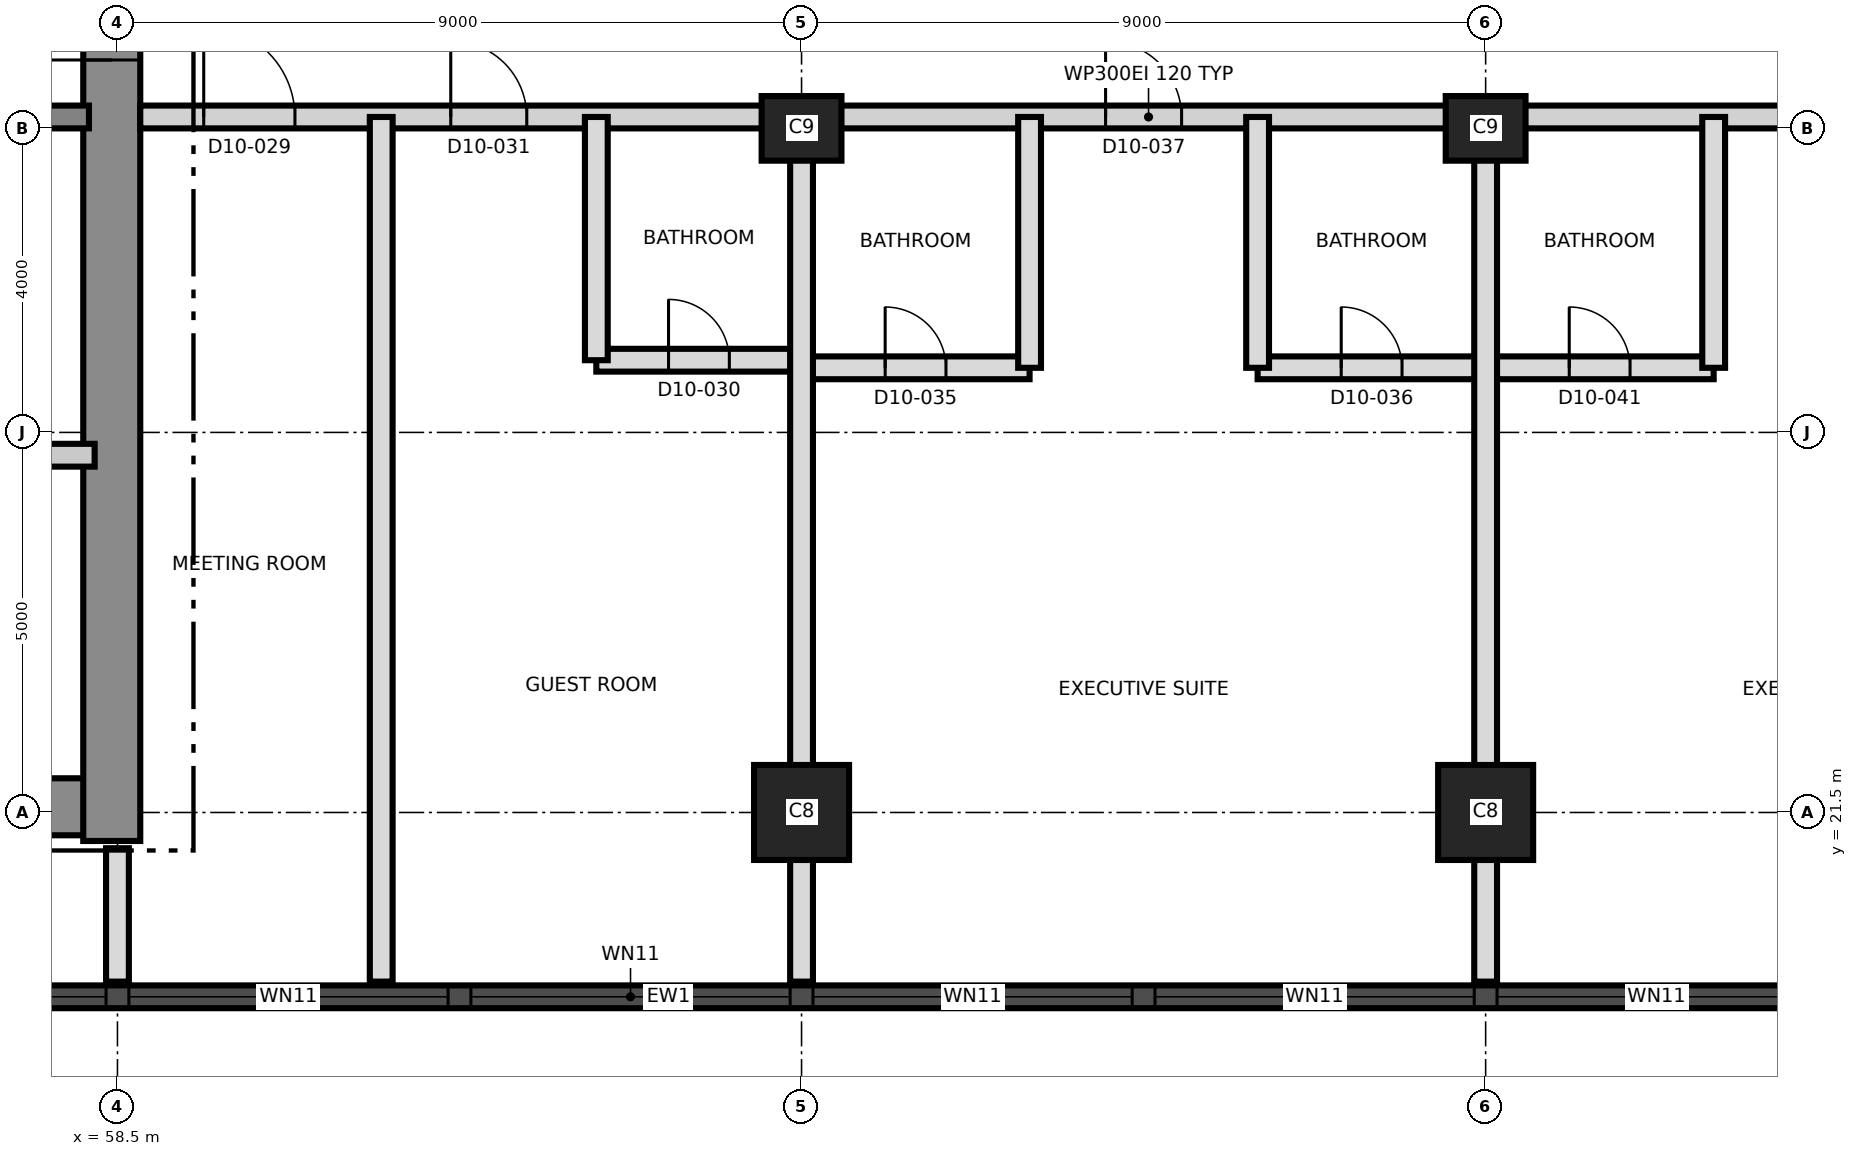
"""IFC4 building model, lengths in metres.
Left out: names, types, materials, properties, quantities, classifications, styles, units other than length and angle.
Written with IfcOpenShell. Run it as: python <this file> out.ifc"""

import sys

from ifc_helpers import new_model, si_unit, direction, frame, frame_2d, origin, origin_2d, place, context, subcontext, project, spatial, rectangle, extrude, element, fill, save


model = new_model("IFC4")
c1 = context("Model", 3, precision=1e-05, world=origin(), true_north=direction((0.0, 1.0)))
c2 = subcontext(c1, "Body", "Model", "MODEL_VIEW")
j1 = project(units=[si_unit("LENGTHUNIT", "METRE"), si_unit("PLANEANGLEUNIT", "RADIAN")], contexts=[c1])
p1 = place(None, origin())
s1 = spatial("IfcSite", under=j1, at=p1, CompositionType="ELEMENT")
p2 = place(p1, origin())
s2 = spatial("IfcBuilding", under=s1, at=p2, CompositionType="ELEMENT")
p3 = place(p2, frame((0.0, 0.0, 120.4)))
s3 = spatial("IfcBuildingStorey", under=s2, at=p3, CompositionType="ELEMENT", Elevation=120.4)
p4 = place(p3, frame((31.125, 21.575, 0.0), z_axis=(0.0, 0.0, 1.0), x_axis=(1.0, 0.0, 0.0)))
e1 = element("IfcWall", 1, at=p4, inside=s3, PredefinedType="SHEAR", context=c2, shape_type="SweptSolid", body=[
    extrude(rectangle(XDim=27.0, YDim=0.75, at=frame_2d((13.5, 0.0))), origin(), (0.0, 0.0, 1.0), 3.7),
])
p5 = place(p3, frame((58.425, 21.125, 0.0), z_axis=(0.0, 0.0, 1.0), x_axis=(0.0, 1.0, 0.0)))
e2 = element("IfcWall", 2, at=p5, inside=s3, PredefinedType="SHEAR", context=c2, shape_type="SweptSolid", body=[
    extrude(rectangle(XDim=18.75, YDim=0.75, at=frame_2d((9.375, 0.0))), origin(), (0.0, 0.0, 1.0), 3.7),
])
p6 = place(p5, frame((10.275, 0.0, 0.0)))
e3 = element("IfcOpeningElement", 3, at=p6, cuts=e2, PredefinedType="OPENING", context=c2, shape_type="SweptSolid", body=[
    extrude(rectangle(XDim=1.2, YDim=2.1, at=frame_2d((0.6, 1.05))), frame((0.0, 0.385, 0.0), z_axis=(0.0, -1.0, 0.0), x_axis=(1.0, 0.0, 0.0)), (0.0, 0.0, 1.0), 0.77),
])
p7 = place(p3, frame((31.875, 30.65, 0.0), z_axis=(0.0, 0.0, 1.0), x_axis=(1.0, 0.0, 0.0)))
e4 = element("IfcWall", 4, at=p7, inside=s3, PredefinedType="SHEAR", context=c2, shape_type="SweptSolid", body=[
    extrude(rectangle(XDim=26.25, YDim=0.3, at=frame_2d((13.125, 0.0))), origin(), (0.0, 0.0, 1.0), 3.7),
])
p8 = place(p7, frame((24.625, 0.0, 0.0)))
e5 = element("IfcOpeningElement", 5, at=p8, cuts=e4, PredefinedType="OPENING", context=c2, shape_type="SweptSolid", body=[
    extrude(rectangle(XDim=1.0, YDim=2.1, at=frame_2d((0.5, 1.05))), frame((0.0, 0.16, 0.0), z_axis=(0.0, -1.0, 0.0), x_axis=(1.0, 0.0, 0.0)), (0.0, 0.0, 1.0), 0.32),
])
p9 = place(p7, frame((11.425, 0.0, 0.0)))
e6 = element("IfcOpeningElement", 6, at=p9, cuts=e4, PredefinedType="OPENING", context=c2, shape_type="SweptSolid", body=[
    extrude(rectangle(XDim=1.0, YDim=2.1, at=frame_2d((0.5, 1.05))), frame((0.0, 0.16, 0.0), z_axis=(0.0, -1.0, 0.0), x_axis=(1.0, 0.0, 0.0)), (0.0, 0.0, 1.0), 0.32),
])
for number, where, z_axis, x_axis in (
    (7, (67.5, 21.5, 0.0), (0.0, 0.0, 1.0), (1.0, 0.0, 0.0)),
    (8, (76.5, 21.5, 0.0), (0.0, 0.0, 1.0), (1.0, 0.0, 0.0)),
):
    element("IfcColumn", number, at=place(p3, frame(where, z_axis=z_axis, x_axis=x_axis)), inside=s3, PredefinedType="COLUMN", context=c2, shape_type="SweptSolid", body=[
        extrude(rectangle(XDim=1.25, YDim=1.25, at=origin_2d()), origin(), (0.0, 0.0, 1.0), 3.7),
    ])
for number, where, z_axis, x_axis in (
    (9, (67.5, 30.5, 0.0), (0.0, 0.0, 1.0), (1.0, 0.0, 0.0)),
    (10, (76.5, 30.5, 0.0), (0.0, 0.0, 1.0), (1.0, 0.0, 0.0)),
):
    element("IfcColumn", number, at=place(p3, frame(where, z_axis=z_axis, x_axis=x_axis)), inside=s3, PredefinedType="COLUMN", context=c2, shape_type="SweptSolid", body=[
        extrude(rectangle(XDim=1.05, YDim=0.85, at=origin_2d()), origin(), (0.0, 0.0, 1.0), 3.7),
    ])
p10 = place(p3, frame((44.01, 19.075, 0.0), z_axis=(0.0, 0.0, 1.0), x_axis=(1.0, 0.0, 0.0)))
e11 = element("IfcWall", 11, at=p10, inside=s3, PredefinedType="SOLIDWALL", context=c2, shape_type="SweptSolid", body=[
    extrude(rectangle(XDim=43.478, YDim=0.3, at=frame_2d((21.739, 0.0))), origin(), (0.0, 0.0, 1.0), 3.4),
])
p11 = place(p10, frame((1.845, 0.0, 0.3)))
e12 = element("IfcOpeningElement", 12, at=p11, cuts=e11, PredefinedType="OPENING", context=c2, shape_type="SweptSolid", body=[
    extrude(rectangle(XDim=1.8, YDim=2.4, at=frame_2d((0.9, 1.2))), frame((0.0, 0.16, 0.0), z_axis=(0.0, -1.0, 0.0), x_axis=(1.0, 0.0, 0.0)), (0.0, 0.0, 1.0), 0.32),
])
p12 = place(p10, frame((5.64, 0.0, 0.9)))
e13 = element("IfcOpeningElement", 13, at=p12, cuts=e11, PredefinedType="OPENING", context=c2, shape_type="SweptSolid", body=[
    extrude(rectangle(XDim=4.2, YDim=1.5, at=frame_2d((2.1, 0.75))), frame((0.0, 0.16, 0.0), z_axis=(0.0, -1.0, 0.0), x_axis=(1.0, 0.0, 0.0)), (0.0, 0.0, 1.0), 0.32),
])
p13 = place(p10, frame((10.14, 0.0, 0.9)))
e14 = element("IfcOpeningElement", 14, at=p13, cuts=e11, PredefinedType="OPENING", context=c2, shape_type="SweptSolid", body=[
    extrude(rectangle(XDim=4.2, YDim=1.5, at=frame_2d((2.1, 0.75))), frame((0.0, 0.16, 0.0), z_axis=(0.0, -1.0, 0.0), x_axis=(1.0, 0.0, 0.0)), (0.0, 0.0, 1.0), 0.32),
])
p14 = place(p10, frame((14.64, 0.0, 0.9)))
e15 = element("IfcOpeningElement", 15, at=p14, cuts=e11, PredefinedType="OPENING", context=c2, shape_type="SweptSolid", body=[
    extrude(rectangle(XDim=4.2, YDim=1.5, at=frame_2d((2.1, 0.75))), frame((0.0, 0.16, 0.0), z_axis=(0.0, -1.0, 0.0), x_axis=(1.0, 0.0, 0.0)), (0.0, 0.0, 1.0), 0.32),
])
p15 = place(p10, frame((19.14, 0.0, 0.9)))
e16 = element("IfcOpeningElement", 16, at=p15, cuts=e11, PredefinedType="OPENING", context=c2, shape_type="SweptSolid", body=[
    extrude(rectangle(XDim=4.2, YDim=1.5, at=frame_2d((2.1, 0.75))), frame((0.0, 0.16, 0.0), z_axis=(0.0, -1.0, 0.0), x_axis=(1.0, 0.0, 0.0)), (0.0, 0.0, 1.0), 0.32),
])
p16 = place(p10, frame((23.64, 0.0, 0.9)))
e17 = element("IfcOpeningElement", 17, at=p16, cuts=e11, PredefinedType="OPENING", context=c2, shape_type="SweptSolid", body=[
    extrude(rectangle(XDim=4.2, YDim=1.5, at=frame_2d((2.1, 0.75))), frame((0.0, 0.16, 0.0), z_axis=(0.0, -1.0, 0.0), x_axis=(1.0, 0.0, 0.0)), (0.0, 0.0, 1.0), 0.32),
])
p17 = place(p10, frame((28.14, 0.0, 0.9)))
e18 = element("IfcOpeningElement", 18, at=p17, cuts=e11, PredefinedType="OPENING", context=c2, shape_type="SweptSolid", body=[
    extrude(rectangle(XDim=4.2, YDim=1.5, at=frame_2d((2.1, 0.75))), frame((0.0, 0.16, 0.0), z_axis=(0.0, -1.0, 0.0), x_axis=(1.0, 0.0, 0.0)), (0.0, 0.0, 1.0), 0.32),
])
p18 = place(p10, frame((32.64, 0.0, 0.9)))
e19 = element("IfcOpeningElement", 19, at=p18, cuts=e11, PredefinedType="OPENING", context=c2, shape_type="SweptSolid", body=[
    extrude(rectangle(XDim=4.2, YDim=1.5, at=frame_2d((2.1, 0.75))), frame((0.0, 0.16, 0.0), z_axis=(0.0, -1.0, 0.0), x_axis=(1.0, 0.0, 0.0)), (0.0, 0.0, 1.0), 0.32),
])
p19 = place(p10, frame((37.14, 0.0, 0.9)))
e20 = element("IfcOpeningElement", 20, at=p19, cuts=e11, PredefinedType="OPENING", context=c2, shape_type="SweptSolid", body=[
    extrude(rectangle(XDim=4.2, YDim=1.5, at=frame_2d((2.1, 0.75))), frame((0.0, 0.16, 0.0), z_axis=(0.0, -1.0, 0.0), x_axis=(1.0, 0.0, 0.0)), (0.0, 0.0, 1.0), 0.32),
])
p20 = place(p3, frame((55.8, 26.2, 0.0), z_axis=(0.0, 0.0, 1.0), x_axis=(1.0, 0.0, 0.0)))
e21 = element("IfcWall", 21, at=p20, inside=s3, PredefinedType="PARTITIONING", context=c2, shape_type="SweptSolid", body=[
    extrude(rectangle(XDim=2.4, YDim=0.3, at=frame_2d((1.2, 0.0))), origin(), (0.0, 0.0, 1.0), 3.4),
])
p21 = place(p20, frame((0.75, 0.0, 0.0)))
e22 = element("IfcOpeningElement", 22, at=p21, cuts=e21, PredefinedType="OPENING", context=c2, shape_type="SweptSolid", body=[
    extrude(rectangle(XDim=0.9, YDim=2.1, at=frame_2d((0.45, 1.05))), frame((0.0, 0.16, 0.0), z_axis=(0.0, -1.0, 0.0), x_axis=(1.0, 0.0, 0.0)), (0.0, 0.0, 1.0), 0.32),
])
p22 = place(p3, frame((67.5, 27.35, 0.0), z_axis=(0.0, 0.0, 1.0), x_axis=(1.0, 0.0, 0.0)))
e23 = element("IfcWall", 23, at=p22, inside=s3, PredefinedType="PARTITIONING", context=c2, shape_type="SweptSolid", body=[
    extrude(rectangle(XDim=3.0, YDim=0.3, at=frame_2d((1.5, 0.0))), origin(), (0.0, 0.0, 1.0), 3.4),
])
p23 = place(p22, frame((1.1, 0.0, 0.0)))
e24 = element("IfcOpeningElement", 24, at=p23, cuts=e23, PredefinedType="OPENING", context=c2, shape_type="SweptSolid", body=[
    extrude(rectangle(XDim=0.8, YDim=2.1, at=frame_2d((0.4, 1.05))), frame((0.0, 0.16, 0.0), z_axis=(0.0, -1.0, 0.0), x_axis=(1.0, 0.0, 0.0)), (0.0, 0.0, 1.0), 0.32),
])
p24 = place(p3, frame((73.5, 27.35, 0.0), z_axis=(0.0, 0.0, 1.0), x_axis=(1.0, 0.0, 0.0)))
e25 = element("IfcWall", 25, at=p24, inside=s3, PredefinedType="PARTITIONING", context=c2, shape_type="SweptSolid", body=[
    extrude(rectangle(XDim=6.0, YDim=0.3, at=frame_2d((3.0, 0.0))), origin(), (0.0, 0.0, 1.0), 3.4),
])
p25 = place(p24, frame((1.1, 0.0, 0.0)))
e26 = element("IfcOpeningElement", 26, at=p25, cuts=e25, PredefinedType="OPENING", context=c2, shape_type="SweptSolid", body=[
    extrude(rectangle(XDim=0.8, YDim=2.1, at=frame_2d((0.4, 1.05))), frame((0.0, 0.16, 0.0), z_axis=(0.0, -1.0, 0.0), x_axis=(1.0, 0.0, 0.0)), (0.0, 0.0, 1.0), 0.32),
])
p26 = place(p24, frame((4.1, 0.0, 0.0)))
e27 = element("IfcOpeningElement", 27, at=p26, cuts=e25, PredefinedType="OPENING", context=c2, shape_type="SweptSolid", body=[
    extrude(rectangle(XDim=0.8, YDim=2.1, at=frame_2d((0.4, 1.05))), frame((0.0, 0.16, 0.0), z_axis=(0.0, -1.0, 0.0), x_axis=(1.0, 0.0, 0.0)), (0.0, 0.0, 1.0), 0.32),
])
p27 = place(p3, frame((64.8, 27.45, 0.0), z_axis=(0.0, 0.0, 1.0), x_axis=(1.0, 0.0, 0.0)))
e28 = element("IfcWall", 28, at=p27, inside=s3, PredefinedType="PARTITIONING", context=c2, shape_type="SweptSolid", body=[
    extrude(rectangle(XDim=2.7, YDim=0.3, at=frame_2d((1.35, 0.0))), origin(), (0.0, 0.0, 1.0), 3.4),
])
p28 = place(p27, frame((0.95, 0.0, 0.0)))
e29 = element("IfcOpeningElement", 29, at=p28, cuts=e28, PredefinedType="OPENING", context=c2, shape_type="SweptSolid", body=[
    extrude(rectangle(XDim=0.8, YDim=2.1, at=frame_2d((0.4, 1.05))), frame((0.0, 0.16, 0.0), z_axis=(0.0, -1.0, 0.0), x_axis=(1.0, 0.0, 0.0)), (0.0, 0.0, 1.0), 0.32),
])
p29 = place(p3, frame((58.8, 30.65, 0.0), z_axis=(0.0, 0.0, 1.0), x_axis=(1.0, 0.0, 0.0)))
e30 = element("IfcWall", 30, at=p29, inside=s3, PredefinedType="PARTITIONING", context=c2, shape_type="SweptSolid", body=[
    extrude(rectangle(XDim=26.53, YDim=0.3, at=frame_2d((13.265, 0.0))), origin(), (0.0, 0.0, 1.0), 3.4),
])
p30 = place(p29, frame((0.835, 0.0, 0.0)))
e31 = element("IfcOpeningElement", 31, at=p30, cuts=e30, PredefinedType="OPENING", context=c2, shape_type="SweptSolid", body=[
    extrude(rectangle(XDim=1.2, YDim=2.1, at=frame_2d((0.6, 1.05))), frame((0.0, 0.16, 0.0), z_axis=(0.0, -1.0, 0.0), x_axis=(1.0, 0.0, 0.0)), (0.0, 0.0, 1.0), 0.32),
])
p31 = place(p29, frame((4.085, 0.0, 0.0)))
e32 = element("IfcOpeningElement", 32, at=p31, cuts=e30, PredefinedType="OPENING", context=c2, shape_type="SweptSolid", body=[
    extrude(rectangle(XDim=1.0, YDim=2.1, at=frame_2d((0.5, 1.05))), frame((0.0, 0.16, 0.0), z_axis=(0.0, -1.0, 0.0), x_axis=(1.0, 0.0, 0.0)), (0.0, 0.0, 1.0), 0.32),
])
p32 = place(p29, frame((12.7, 0.0, 0.0)))
e33 = element("IfcOpeningElement", 33, at=p32, cuts=e30, PredefinedType="OPENING", context=c2, shape_type="SweptSolid", body=[
    extrude(rectangle(XDim=1.0, YDim=2.4, at=frame_2d((0.5, 1.2))), frame((0.0, 0.16, 0.0), z_axis=(0.0, -1.0, 0.0), x_axis=(1.0, 0.0, 0.0)), (0.0, 0.0, 1.0), 0.32),
])
p33 = place(p29, frame((21.7, 0.0, 0.0)))
e34 = element("IfcOpeningElement", 34, at=p33, cuts=e30, PredefinedType="OPENING", context=c2, shape_type="SweptSolid", body=[
    extrude(rectangle(XDim=1.0, YDim=2.4, at=frame_2d((0.5, 1.2))), frame((0.0, 0.16, 0.0), z_axis=(0.0, -1.0, 0.0), x_axis=(1.0, 0.0, 0.0)), (0.0, 0.0, 1.0), 0.32),
])
p34 = place(p3, frame((58.5, 19.275, 0.0), z_axis=(0.0, 0.0, 1.0), x_axis=(0.0, 1.0, 0.0)))
e35 = element("IfcWall", 35, at=p34, inside=s3, PredefinedType="PARTITIONING", context=c2, shape_type="SweptSolid", body=[
    extrude(rectangle(XDim=1.755, YDim=0.3, at=frame_2d((0.877, 0.0))), origin(), (0.0, 0.0, 1.0), 3.35),
])
p35 = place(p3, frame((61.97, 19.275, 0.0), z_axis=(0.0, 0.0, 1.0), x_axis=(0.0, 1.0, 0.0)))
e36 = element("IfcWall", 36, at=p35, inside=s3, PredefinedType="PARTITIONING", context=c2, shape_type="SweptSolid", body=[
    extrude(rectangle(XDim=11.375, YDim=0.3, at=frame_2d((5.688, 0.0))), origin(), (0.0, 0.0, 1.0), 3.35),
])
p36 = place(p3, frame((64.8, 27.45, 0.0), z_axis=(0.0, 0.0, 1.0), x_axis=(0.0, 1.0, 0.0)))
e37 = element("IfcWall", 37, at=p36, inside=s3, PredefinedType="PARTITIONING", context=c2, shape_type="SweptSolid", body=[
    extrude(rectangle(XDim=3.2, YDim=0.3, at=frame_2d((1.6, 0.0))), origin(), (0.0, 0.0, 1.0), 3.4),
])
p37 = place(p3, frame((67.5, 19.275, 0.0), z_axis=(0.0, 0.0, 1.0), x_axis=(0.0, 1.0, 0.0)))
e38 = element("IfcWall", 38, at=p37, inside=s3, PredefinedType="PARTITIONING", context=c2, shape_type="SweptSolid", body=[
    extrude(rectangle(XDim=11.375, YDim=0.3, at=frame_2d((5.688, 0.0))), origin(), (0.0, 0.0, 1.0), 3.35),
])
for number, where, z_axis, x_axis in (
    (39, (70.5, 27.35, 0.0), (0.0, 0.0, 1.0), (0.0, 1.0, 0.0)),
    (40, (73.5, 27.35, 0.0), (0.0, 0.0, 1.0), (0.0, 1.0, 0.0)),
):
    element("IfcWall", number, at=place(p3, frame(where, z_axis=z_axis, x_axis=x_axis)), inside=s3, PredefinedType="PARTITIONING", context=c2, shape_type="SweptSolid", body=[
        extrude(rectangle(XDim=3.3, YDim=0.3, at=frame_2d((1.65, 0.0))), origin(), (0.0, 0.0, 1.0), 3.4),
    ])
p38 = place(p3, frame((76.5, 19.275, 0.0), z_axis=(0.0, 0.0, 1.0), x_axis=(0.0, 1.0, 0.0)))
e41 = element("IfcWall", 41, at=p38, inside=s3, PredefinedType="PARTITIONING", context=c2, shape_type="SweptSolid", body=[
    extrude(rectangle(XDim=11.375, YDim=0.3, at=frame_2d((5.688, 0.0))), origin(), (0.0, 0.0, 1.0), 3.35),
])
p39 = place(p3, frame((79.5, 27.35, 0.0), z_axis=(0.0, 0.0, 1.0), x_axis=(0.0, 1.0, 0.0)))
e42 = element("IfcWall", 42, at=p39, inside=s3, PredefinedType="PARTITIONING", context=c2, shape_type="SweptSolid", body=[
    extrude(rectangle(XDim=3.3, YDim=0.3, at=frame_2d((1.65, 0.0))), origin(), (0.0, 0.0, 1.0), 3.4),
])
p40 = place(p13, origin())
e43 = element("IfcWindow", 43, at=p40, inside=s3, PartitioningType="SINGLE_PANEL", PredefinedType="WINDOW", context=c2, shape_type="SweptSolid", body=[
    extrude(rectangle(XDim=4.2, YDim=1.5, at=frame_2d((2.1, 0.75))), frame((0.0, 0.03, 0.0), z_axis=(0.0, -1.0, 0.0), x_axis=(1.0, 0.0, 0.0)), (0.0, 0.0, 1.0), 0.06),
])
fill(e14, e43)
p41 = place(p14, origin())
e44 = element("IfcWindow", 44, at=p41, inside=s3, PartitioningType="SINGLE_PANEL", PredefinedType="WINDOW", context=c2, shape_type="SweptSolid", body=[
    extrude(rectangle(XDim=4.2, YDim=1.5, at=frame_2d((2.1, 0.75))), frame((0.0, 0.03, 0.0), z_axis=(0.0, -1.0, 0.0), x_axis=(1.0, 0.0, 0.0)), (0.0, 0.0, 1.0), 0.06),
])
fill(e15, e44)
p42 = place(p15, origin())
e45 = element("IfcWindow", 45, at=p42, inside=s3, PartitioningType="SINGLE_PANEL", PredefinedType="WINDOW", context=c2, shape_type="SweptSolid", body=[
    extrude(rectangle(XDim=4.2, YDim=1.5, at=frame_2d((2.1, 0.75))), frame((0.0, 0.03, 0.0), z_axis=(0.0, -1.0, 0.0), x_axis=(1.0, 0.0, 0.0)), (0.0, 0.0, 1.0), 0.06),
])
fill(e16, e45)
p43 = place(p16, origin())
e46 = element("IfcWindow", 46, at=p43, inside=s3, PartitioningType="SINGLE_PANEL", PredefinedType="WINDOW", context=c2, shape_type="SweptSolid", body=[
    extrude(rectangle(XDim=4.2, YDim=1.5, at=frame_2d((2.1, 0.75))), frame((0.0, 0.03, 0.0), z_axis=(0.0, -1.0, 0.0), x_axis=(1.0, 0.0, 0.0)), (0.0, 0.0, 1.0), 0.06),
])
fill(e17, e46)
p44 = place(p17, origin())
e47 = element("IfcWindow", 47, at=p44, inside=s3, PartitioningType="SINGLE_PANEL", PredefinedType="WINDOW", context=c2, shape_type="SweptSolid", body=[
    extrude(rectangle(XDim=4.2, YDim=1.5, at=frame_2d((2.1, 0.75))), frame((0.0, 0.03, 0.0), z_axis=(0.0, -1.0, 0.0), x_axis=(1.0, 0.0, 0.0)), (0.0, 0.0, 1.0), 0.06),
])
fill(e18, e47)
p45 = place(p18, origin())
e48 = element("IfcWindow", 48, at=p45, inside=s3, PartitioningType="SINGLE_PANEL", PredefinedType="WINDOW", context=c2, shape_type="SweptSolid", body=[
    extrude(rectangle(XDim=4.2, YDim=1.5, at=frame_2d((2.1, 0.75))), frame((0.0, 0.03, 0.0), z_axis=(0.0, -1.0, 0.0), x_axis=(1.0, 0.0, 0.0)), (0.0, 0.0, 1.0), 0.06),
])
fill(e19, e48)
p46 = place(p6, origin())
e49 = element("IfcDoor", 49, at=p46, inside=s3, OperationType="SINGLE_SWING_LEFT", PredefinedType="DOOR", context=c2, shape_type="SweptSolid", body=[
    extrude(rectangle(XDim=1.2, YDim=2.1, at=frame_2d((0.6, 1.05))), frame((0.0, 0.025, 0.0), z_axis=(0.0, -1.0, 0.0), x_axis=(1.0, 0.0, 0.0)), (0.0, 0.0, 1.0), 0.05),
])
fill(e3, e49)
p47 = place(p30, origin())
e50 = element("IfcDoor", 50, at=p47, inside=s3, OperationType="SINGLE_SWING_LEFT", PredefinedType="DOOR", context=c2, shape_type="SweptSolid", body=[
    extrude(rectangle(XDim=1.2, YDim=2.1, at=frame_2d((0.6, 1.05))), frame((0.0, 0.025, 0.0), z_axis=(0.0, -1.0, 0.0), x_axis=(1.0, 0.0, 0.0)), (0.0, 0.0, 1.0), 0.05),
])
fill(e31, e50)
p48 = place(p28, origin())
e51 = element("IfcDoor", 51, at=p48, inside=s3, OperationType="SINGLE_SWING_RIGHT", PredefinedType="DOOR", context=c2, shape_type="SweptSolid", body=[
    extrude(rectangle(XDim=0.8, YDim=2.1, at=frame_2d((0.4, 1.05))), frame((0.0, 0.025, 0.0), z_axis=(0.0, -1.0, 0.0), x_axis=(1.0, 0.0, 0.0)), (0.0, 0.0, 1.0), 0.05),
])
fill(e29, e51)
p49 = place(p31, origin())
e52 = element("IfcDoor", 52, at=p49, inside=s3, OperationType="SINGLE_SWING_LEFT", PredefinedType="DOOR", context=c2, shape_type="SweptSolid", body=[
    extrude(rectangle(XDim=1.0, YDim=2.1, at=frame_2d((0.5, 1.05))), frame((0.0, 0.025, 0.0), z_axis=(0.0, -1.0, 0.0), x_axis=(1.0, 0.0, 0.0)), (0.0, 0.0, 1.0), 0.05),
])
fill(e32, e52)
p50 = place(p23, origin())
e53 = element("IfcDoor", 53, at=p50, inside=s3, OperationType="SINGLE_SWING_LEFT", PredefinedType="DOOR", context=c2, shape_type="SweptSolid", body=[
    extrude(rectangle(XDim=0.8, YDim=2.1, at=frame_2d((0.4, 1.05))), frame((0.0, 0.025, 0.0), z_axis=(0.0, -1.0, 0.0), x_axis=(1.0, 0.0, 0.0)), (0.0, 0.0, 1.0), 0.05),
])
fill(e24, e53)
p51 = place(p25, origin())
e54 = element("IfcDoor", 54, at=p51, inside=s3, OperationType="SINGLE_SWING_RIGHT", PredefinedType="DOOR", context=c2, shape_type="SweptSolid", body=[
    extrude(rectangle(XDim=0.8, YDim=2.1, at=frame_2d((0.4, 1.05))), frame((0.0, 0.025, 0.0), z_axis=(0.0, -1.0, 0.0), x_axis=(1.0, 0.0, 0.0)), (0.0, 0.0, 1.0), 0.05),
])
fill(e26, e54)
p52 = place(p32, origin())
e55 = element("IfcDoor", 55, at=p52, inside=s3, OperationType="SINGLE_SWING_LEFT", PredefinedType="DOOR", context=c2, shape_type="SweptSolid", body=[
    extrude(rectangle(XDim=1.0, YDim=2.4, at=frame_2d((0.5, 1.2))), frame((0.0, 0.025, 0.0), z_axis=(0.0, -1.0, 0.0), x_axis=(1.0, 0.0, 0.0)), (0.0, 0.0, 1.0), 0.05),
])
fill(e33, e55)
p53 = place(p26, origin())
e56 = element("IfcDoor", 56, at=p53, inside=s3, OperationType="SINGLE_SWING_LEFT", PredefinedType="DOOR", context=c2, shape_type="SweptSolid", body=[
    extrude(rectangle(XDim=0.8, YDim=2.1, at=frame_2d((0.4, 1.05))), frame((0.0, 0.025, 0.0), z_axis=(0.0, -1.0, 0.0), x_axis=(1.0, 0.0, 0.0)), (0.0, 0.0, 1.0), 0.05),
])
fill(e27, e56)
save(model, sys.argv[1])
